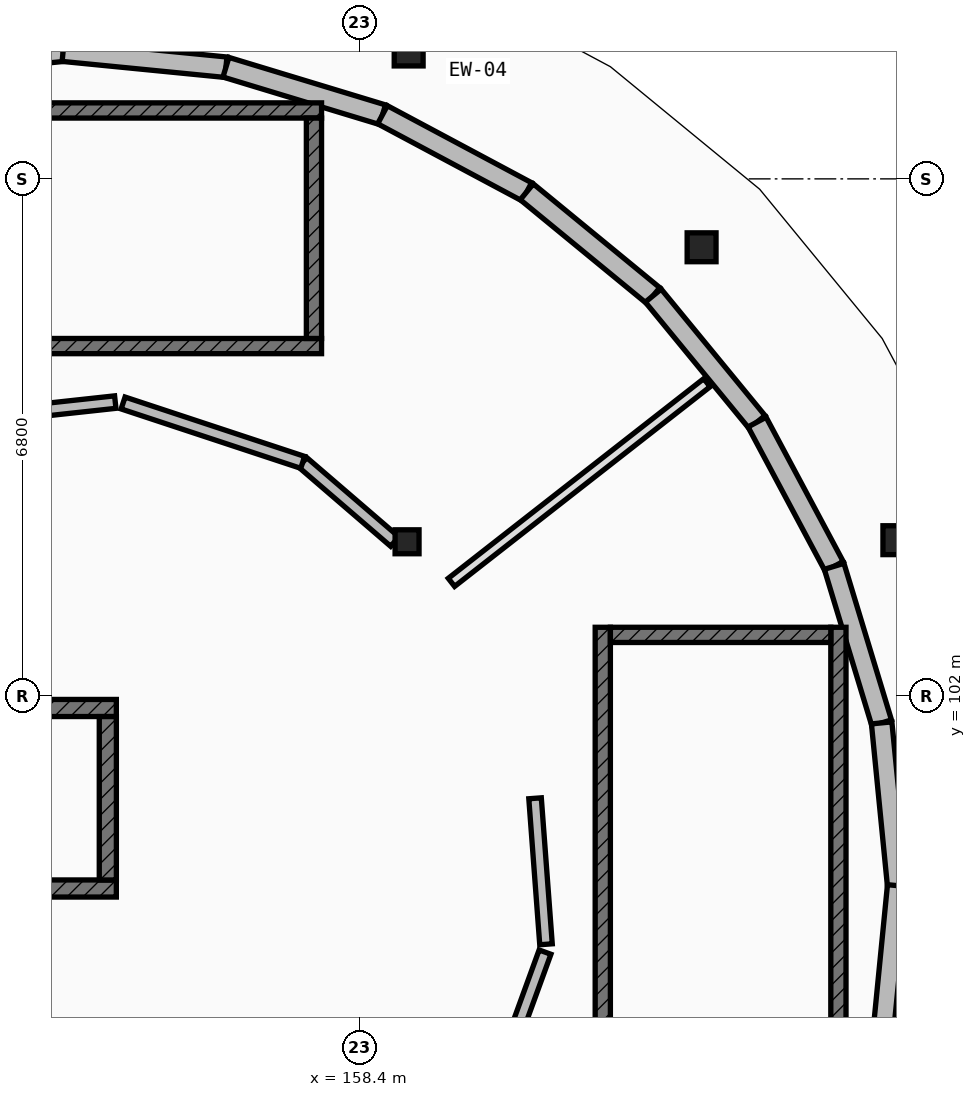
"""IFC4 building model, lengths in metres.
Left out: names, types, materials, properties, quantities, classifications, styles, units other than length and angle.
Written with IfcOpenShell. Run it as: python <this file> out.ifc"""

import sys

from ifc_helpers import new_model, si_unit, direction, frame, frame_2d, origin, origin_2d, place, context, subcontext, project, spatial, rectangle, circle, extrude, element, fill, save


model = new_model("IFC4")
c1 = context("Model", 3, precision=1e-05, world=origin(), true_north=direction((0.0, 1.0)))
c2 = subcontext(c1, "Body", "Model", "MODEL_VIEW")
j1 = project(units=[si_unit("LENGTHUNIT", "METRE"), si_unit("PLANEANGLEUNIT", "RADIAN")], contexts=[c1])
p1 = place(None, origin())
s1 = spatial("IfcSite", under=j1, at=p1, CompositionType="ELEMENT")
p2 = place(p1, origin())
s2 = spatial("IfcBuilding", under=s1, at=p2, CompositionType="ELEMENT")
p3 = place(p2, frame((0.0, 0.0, 12.95)))
s3 = spatial("IfcBuildingStorey", under=s2, at=p3, CompositionType="ELEMENT", Elevation=12.95)
for number, where, z_axis, x_axis in (
    (1, (165.476, 104.046, 0.0), (0.0, 0.0, 1.0), (1.0, 0.0, 0.0)),
    (2, (162.9, 107.9, 0.0), (0.0, 0.0, 1.0), (1.0, 0.0, 0.0)),
    (3, (159.046, 110.476, 0.0), (0.0, 0.0, 1.0), (1.0, 0.0, 0.0)),
):
    element("IfcColumn", number, at=place(p3, frame(where, z_axis=z_axis, x_axis=x_axis)), inside=s3, PredefinedType="PILASTER", context=c2, shape_type="SweptSolid", body=[
        extrude(circle(Radius=0.19, at=origin_2d()), origin(), (0.0, 0.0, 1.0), 4.2),
    ])
p4 = place(p3, frame((159.025, 104.025, 0.0), z_axis=(0.0, 0.0, 1.0), x_axis=(1.0, 0.0, 0.0)))
e4 = element("IfcColumn", 4, at=p4, inside=s3, PredefinedType="COLUMN", context=c2, shape_type="SweptSolid", body=[
    extrude(rectangle(XDim=0.315, YDim=0.315, at=origin_2d()), origin(), (0.0, 0.0, 1.0), 4.2),
])
for number, where, z_axis, x_axis in (
    (5, (152.358, 110.269, 0.0), (0.0, 0.0, 1.0), (0.995, 0.098, 0.0)),
    (6, (154.5, 110.48, 0.0), (0.0, 0.0, 1.0), (0.995, -0.098, 0.0)),
):
    element("IfcWall", number, at=place(p3, frame(where, z_axis=z_axis, x_axis=x_axis)), inside=s3, PredefinedType="ELEMENTEDWALL", context=c2, shape_type="SweptSolid", body=[
        extrude(rectangle(XDim=2.152, YDim=0.27, at=frame_2d((1.076, 0.0))), origin(), (0.0, 0.0, 1.0), 3.314),
    ])
p5 = place(p3, frame((156.642, 110.269, 0.0), z_axis=(0.0, 0.0, 1.0), x_axis=(0.95691941216, -0.290353644083, 0.0)))
e7 = element("IfcWall", 7, at=p5, inside=s3, PredefinedType="ELEMENTEDWALL", context=c2, shape_type="SweptSolid", body=[
    extrude(rectangle(XDim=2.153, YDim=0.27, at=frame_2d((1.076, 0.0))), origin(), (0.0, 0.0, 1.0), 3.314),
])
p6 = place(p5, frame((0.601, 0.0, 0.85)))
e8 = element("IfcOpeningElement", 8, at=p6, cuts=e7, PredefinedType="OPENING", context=c2, shape_type="SweptSolid", body=[
    extrude(rectangle(XDim=0.95, YDim=2.05, at=frame_2d((0.475, 1.025))), frame((0.0, 0.145, 0.0), z_axis=(0.0, -1.0, 0.0), x_axis=(1.0, 0.0, 0.0)), (0.0, 0.0, 1.0), 0.29),
])
p7 = place(p3, frame((158.702, 109.644, 0.0), z_axis=(0.0, 0.0, 1.0), x_axis=(0.882007276215, -0.471235784617, 0.0)))
e9 = element("IfcWall", 9, at=p7, inside=s3, PredefinedType="ELEMENTEDWALL", context=c2, shape_type="SweptSolid", body=[
    extrude(rectangle(XDim=2.152, YDim=0.27, at=frame_2d((1.076, 0.0))), origin(), (0.0, 0.0, 1.0), 3.314),
])
p8 = place(p7, frame((0.586, 0.0, 0.85)))
e10 = element("IfcOpeningElement", 10, at=p8, cuts=e9, PredefinedType="OPENING", context=c2, shape_type="SweptSolid", body=[
    extrude(rectangle(XDim=0.98, YDim=1.5, at=frame_2d((0.49, 0.75))), frame((0.0, 0.145, 0.0), z_axis=(0.0, -1.0, 0.0), x_axis=(1.0, 0.0, 0.0)), (0.0, 0.0, 1.0), 0.29),
])
p9 = place(p3, frame((160.6, 108.63, 0.0), z_axis=(0.0, 0.0, 1.0), x_axis=(0.772895091045, -0.634533827498, 0.0)))
e11 = element("IfcWall", 11, at=p9, inside=s3, PredefinedType="ELEMENTEDWALL", context=c2, shape_type="SweptSolid", body=[
    extrude(rectangle(XDim=2.153, YDim=0.27, at=frame_2d((1.076, 0.0))), origin(), (0.0, 0.0, 1.0), 3.314),
])
p10 = place(p9, frame((0.586, 0.0, 0.85)))
e12 = element("IfcOpeningElement", 12, at=p10, cuts=e11, PredefinedType="OPENING", context=c2, shape_type="SweptSolid", body=[
    extrude(rectangle(XDim=0.98, YDim=1.75, at=frame_2d((0.49, 0.875))), frame((0.0, 0.145, 0.0), z_axis=(0.0, -1.0, 0.0), x_axis=(1.0, 0.0, 0.0)), (0.0, 0.0, 1.0), 0.29),
])
p11 = place(p3, frame((162.264, 107.264, 0.0), z_axis=(0.0, 0.0, 1.0), x_axis=(0.634533827498, -0.772895091045, 0.0)))
e13 = element("IfcWall", 13, at=p11, inside=s3, PredefinedType="ELEMENTEDWALL", context=c2, shape_type="SweptSolid", body=[
    extrude(rectangle(XDim=2.153, YDim=0.27, at=frame_2d((1.076, 0.0))), origin(), (0.0, 0.0, 1.0), 3.314),
])
p12 = place(p11, frame((0.576, 0.0, 0.85)))
e14 = element("IfcOpeningElement", 14, at=p12, cuts=e13, PredefinedType="OPENING", context=c2, shape_type="SweptSolid", body=[
    extrude(rectangle(XDim=1.0, YDim=1.45, at=frame_2d((0.5, 0.725))), frame((0.0, 0.145, 0.0), z_axis=(0.0, -1.0, 0.0), x_axis=(1.0, 0.0, 0.0)), (0.0, 0.0, 1.0), 0.29),
])
p13 = place(p3, frame((163.63, 105.6, 0.0), z_axis=(0.0, 0.0, 1.0), x_axis=(0.471235784617, -0.882007276215, 0.0)))
e15 = element("IfcWall", 15, at=p13, inside=s3, PredefinedType="ELEMENTEDWALL", context=c2, shape_type="SweptSolid", body=[
    extrude(rectangle(XDim=2.152, YDim=0.27, at=frame_2d((1.076, 0.0))), origin(), (0.0, 0.0, 1.0), 3.314),
])
p14 = place(p13, frame((0.576, 0.0, 0.85)))
e16 = element("IfcOpeningElement", 16, at=p14, cuts=e15, PredefinedType="OPENING", context=c2, shape_type="SweptSolid", body=[
    extrude(rectangle(XDim=1.0, YDim=1.75, at=frame_2d((0.5, 0.875))), frame((0.0, 0.145, 0.0), z_axis=(0.0, -1.0, 0.0), x_axis=(1.0, 0.0, 0.0)), (0.0, 0.0, 1.0), 0.29),
])
p15 = place(p3, frame((164.644, 103.702, 0.0), z_axis=(0.0, 0.0, 1.0), x_axis=(0.290353644083, -0.95691941216, 0.0)))
e17 = element("IfcWall", 17, at=p15, inside=s3, PredefinedType="ELEMENTEDWALL", context=c2, shape_type="SweptSolid", body=[
    extrude(rectangle(XDim=2.153, YDim=0.27, at=frame_2d((1.076, 0.0))), origin(), (0.0, 0.0, 1.0), 3.314),
])
p16 = place(p15, frame((0.576, 0.0, 0.85)))
e18 = element("IfcOpeningElement", 18, at=p16, cuts=e17, PredefinedType="OPENING", context=c2, shape_type="SweptSolid", body=[
    extrude(rectangle(XDim=1.0, YDim=2.0, at=frame_2d((0.5, 1.0))), frame((0.0, 0.145, 0.0), z_axis=(0.0, -1.0, 0.0), x_axis=(1.0, 0.0, 0.0)), (0.0, 0.0, 1.0), 0.29),
])
for number, where, z_axis, x_axis in (
    (19, (165.269, 101.642, 0.0), (0.0, 0.0, 1.0), (0.098, -0.995, 0.0)),
    (20, (165.48, 99.5, 0.0), (0.0, 0.0, 1.0), (-0.098, -0.995, 0.0)),
):
    element("IfcWall", number, at=place(p3, frame(where, z_axis=z_axis, x_axis=x_axis)), inside=s3, PredefinedType="ELEMENTEDWALL", context=c2, shape_type="SweptSolid", body=[
        extrude(rectangle(XDim=2.152, YDim=0.27, at=frame_2d((1.076, 0.0))), origin(), (0.0, 0.0, 1.0), 3.314),
    ])
p17 = place(p3, frame((161.6, 102.9, 0.0), z_axis=(0.0, 0.0, 1.0), x_axis=(0.0, -1.0, 0.0)))
e21 = element("IfcWall", 21, at=p17, inside=s3, PredefinedType="SHEAR", context=c2, shape_type="SweptSolid", body=[
    extrude(rectangle(XDim=6.8, YDim=0.2, at=frame_2d((3.4, 0.0))), origin(), (0.0, 0.0, 1.0), 3.96),
])
p18 = place(p17, frame((0.38, 0.0, 0.0)))
e22 = element("IfcOpeningElement", 22, at=p18, cuts=e21, PredefinedType="OPENING", context=c2, shape_type="SweptSolid", body=[
    extrude(rectangle(XDim=1.1, YDim=2.15, at=frame_2d((0.55, 1.075))), frame((0.0, 0.11, 0.0), z_axis=(0.0, -1.0, 0.0), x_axis=(1.0, 0.0, 0.0)), (0.0, 0.0, 1.0), 0.22),
])
p19 = place(p3, frame((164.7, 102.9, 0.0), z_axis=(0.0, 0.0, 1.0), x_axis=(0.0, -1.0, 0.0)))
e23 = element("IfcWall", 23, at=p19, inside=s3, PredefinedType="SHEAR", context=c2, shape_type="SweptSolid", body=[
    extrude(rectangle(XDim=6.8, YDim=0.2, at=frame_2d((3.4, 0.0))), origin(), (0.0, 0.0, 1.0), 3.96),
])
p20 = place(p3, frame((161.7, 102.8, 0.0), z_axis=(0.0, 0.0, 1.0), x_axis=(1.0, 0.0, 0.0)))
e24 = element("IfcWall", 24, at=p20, inside=s3, PredefinedType="SHEAR", context=c2, shape_type="SweptSolid", body=[
    extrude(rectangle(XDim=2.9, YDim=0.2, at=frame_2d((1.45, 0.0))), origin(), (0.0, 0.0, 1.0), 3.96),
])
p21 = place(p3, frame((151.1, 106.6, 0.0), z_axis=(0.0, 0.0, 1.0), x_axis=(1.0, 0.0, 0.0)))
e25 = element("IfcWall", 25, at=p21, inside=s3, PredefinedType="SHEAR", context=c2, shape_type="SweptSolid", body=[
    extrude(rectangle(XDim=6.8, YDim=0.2, at=frame_2d((3.4, 0.0))), origin(), (0.0, 0.0, 1.0), 3.96),
])
p22 = place(p21, frame((0.38, 0.0, 0.0)))
e26 = element("IfcOpeningElement", 26, at=p22, cuts=e25, PredefinedType="OPENING", context=c2, shape_type="SweptSolid", body=[
    extrude(rectangle(XDim=1.1, YDim=2.15, at=frame_2d((0.55, 1.075))), frame((0.0, 0.11, 0.0), z_axis=(0.0, -1.0, 0.0), x_axis=(1.0, 0.0, 0.0)), (0.0, 0.0, 1.0), 0.22),
])
p23 = place(p3, frame((151.1, 109.7, 0.0), z_axis=(0.0, 0.0, 1.0), x_axis=(1.0, 0.0, 0.0)))
e27 = element("IfcWall", 27, at=p23, inside=s3, PredefinedType="SHEAR", context=c2, shape_type="SweptSolid", body=[
    extrude(rectangle(XDim=6.8, YDim=0.2, at=frame_2d((3.4, 0.0))), origin(), (0.0, 0.0, 1.0), 3.96),
])
p24 = place(p3, frame((157.8, 106.7, 0.0), z_axis=(0.0, 0.0, 1.0), x_axis=(0.0, 1.0, 0.0)))
e28 = element("IfcWall", 28, at=p24, inside=s3, PredefinedType="SHEAR", context=c2, shape_type="SweptSolid", body=[
    extrude(rectangle(XDim=2.9, YDim=0.2, at=frame_2d((1.45, 0.0))), origin(), (0.0, 0.0, 1.0), 3.96),
])
p25 = place(p3, frame((152.1, 99.463, 0.0), z_axis=(0.0, 0.0, 1.0), x_axis=(1.0, 0.0, 0.0)))
e29 = element("IfcWall", 29, at=p25, inside=s3, PredefinedType="SHEAR", context=c2, shape_type="SweptSolid", body=[
    extrude(rectangle(XDim=3.1, YDim=0.225, at=frame_2d((1.55, 0.0))), origin(), (0.0, 0.0, 1.0), 3.96),
])
p26 = place(p25, frame((0.9, 0.0, 0.0)))
e30 = element("IfcOpeningElement", 30, at=p26, cuts=e29, PredefinedType="OPENING", context=c2, shape_type="SweptSolid", body=[
    extrude(rectangle(XDim=1.3, YDim=2.2, at=frame_2d((0.65, 1.1))), frame((0.0, 0.123, 0.0), z_axis=(0.0, -1.0, 0.0), x_axis=(1.0, 0.0, 0.0)), (0.0, 0.0, 1.0), 0.245),
])
p27 = place(p3, frame((152.1, 101.838, 0.0), z_axis=(0.0, 0.0, 1.0), x_axis=(1.0, 0.0, 0.0)))
e31 = element("IfcWall", 31, at=p27, inside=s3, PredefinedType="SHEAR", context=c2, shape_type="SweptSolid", body=[
    extrude(rectangle(XDim=3.1, YDim=0.225, at=frame_2d((1.55, 0.0))), origin(), (0.0, 0.0, 1.0), 3.96),
])
p28 = place(p3, frame((155.088, 99.575, 0.0), z_axis=(0.0, 0.0, 1.0), x_axis=(0.0, 1.0, 0.0)))
e32 = element("IfcWall", 32, at=p28, inside=s3, PredefinedType="SHEAR", context=c2, shape_type="SweptSolid", body=[
    extrude(rectangle(XDim=2.15, YDim=0.225, at=frame_2d((1.075, 0.0))), origin(), (0.0, 0.0, 1.0), 3.96),
])
p29 = place(p3, frame((159.609, 103.491, 0.0), z_axis=(0.0, 0.0, 1.0), x_axis=(0.787898546349, 0.615805067096, 0.0)))
e33 = element("IfcWall", 33, at=p29, inside=s3, PredefinedType="PLUMBINGWALL", context=c2, shape_type="SweptSolid", body=[
    extrude(rectangle(XDim=4.266, YDim=0.135, at=frame_2d((2.133, 0.0))), origin(), (0.0, 0.0, 1.0), 3.279),
])
p30 = place(p3, frame((155.186, 105.863, 0.0), z_axis=(0.0, 0.0, 1.0), x_axis=(-0.994121595033, -0.108269359885, 0.0)))
e34 = element("IfcWall", 34, at=p30, inside=s3, PredefinedType="PARTITIONING", context=c2, shape_type="SweptSolid", body=[
    extrude(rectangle(XDim=1.847, YDim=0.165, at=frame_2d((0.923, 0.0))), origin(), (0.0, 0.0, 1.0), 3.279),
])
p31 = place(p3, frame((159.919, 96.095, 0.0), z_axis=(0.0, 0.0, 1.0), x_axis=(0.341997778508, 0.939700760612, 0.0)))
e35 = element("IfcWall", 35, at=p31, inside=s3, PredefinedType="PARTITIONING", context=c2, shape_type="SweptSolid", body=[
    extrude(rectangle(XDim=2.693, YDim=0.165, at=frame_2d((1.347, 0.0))), origin(), (0.0, 0.0, 1.0), 3.279),
])
p32 = place(p3, frame((160.853, 98.729, 0.0), z_axis=(0.0, 0.0, 1.0), x_axis=(-0.074777345003, 0.997200255051, 0.0)))
e36 = element("IfcWall", 36, at=p32, inside=s3, PredefinedType="PARTITIONING", context=c2, shape_type="SweptSolid", body=[
    extrude(rectangle(XDim=1.926, YDim=0.165, at=frame_2d((0.963, 0.0))), origin(), (0.0, 0.0, 1.0), 3.279),
])
p33 = place(p3, frame((158.863, 104.028, 0.0), z_axis=(0.0, 0.0, 1.0), x_axis=(-0.758003845194, 0.652250082921, 0.0)))
e37 = element("IfcWall", 37, at=p33, inside=s3, PredefinedType="PARTITIONING", context=c2, shape_type="SweptSolid", body=[
    extrude(rectangle(XDim=1.598, YDim=0.165, at=frame_2d((0.799, 0.0))), origin(), (0.0, 0.0, 1.0), 3.279),
])
p34 = place(p33, frame((0.309, 0.0, 0.0)))
e38 = element("IfcOpeningElement", 38, at=p34, cuts=e37, PredefinedType="OPENING", context=c2, shape_type="SweptSolid", body=[
    extrude(rectangle(XDim=0.98, YDim=2.1, at=frame_2d((0.49, 1.05))), frame((0.0, 0.093, 0.0), z_axis=(0.0, -1.0, 0.0), x_axis=(1.0, 0.0, 0.0)), (0.0, 0.0, 1.0), 0.185),
])
p35 = place(p3, frame((157.652, 105.07, 0.0), z_axis=(0.0, 0.0, 1.0), x_axis=(-0.949484627373, 0.313813547161, 0.0)))
e39 = element("IfcWall", 39, at=p35, inside=s3, PredefinedType="PARTITIONING", context=c2, shape_type="SweptSolid", body=[
    extrude(rectangle(XDim=2.489, YDim=0.165, at=frame_2d((1.244, 0.0))), origin(), (0.0, 0.0, 1.0), 3.279),
])
p36 = place(p6, origin())
e40 = element("IfcWindow", 40, at=p36, inside=s3, PartitioningType="SINGLE_PANEL", PredefinedType="WINDOW", context=c2, shape_type="SweptSolid", body=[
    extrude(rectangle(XDim=0.95, YDim=2.05, at=frame_2d((0.475, 1.025))), frame((0.0, 0.03, 0.0), z_axis=(0.0, -1.0, 0.0), x_axis=(1.0, 0.0, 0.0)), (0.0, 0.0, 1.0), 0.06),
])
fill(e8, e40)
p37 = place(p8, origin())
e41 = element("IfcWindow", 41, at=p37, inside=s3, PartitioningType="SINGLE_PANEL", PredefinedType="WINDOW", context=c2, shape_type="SweptSolid", body=[
    extrude(rectangle(XDim=0.98, YDim=1.5, at=frame_2d((0.49, 0.75))), frame((0.0, 0.03, 0.0), z_axis=(0.0, -1.0, 0.0), x_axis=(1.0, 0.0, 0.0)), (0.0, 0.0, 1.0), 0.06),
])
fill(e10, e41)
p38 = place(p10, origin())
e42 = element("IfcWindow", 42, at=p38, inside=s3, PartitioningType="SINGLE_PANEL", PredefinedType="WINDOW", context=c2, shape_type="SweptSolid", body=[
    extrude(rectangle(XDim=0.98, YDim=1.75, at=frame_2d((0.49, 0.875))), frame((0.0, 0.03, 0.0), z_axis=(0.0, -1.0, 0.0), x_axis=(1.0, 0.0, 0.0)), (0.0, 0.0, 1.0), 0.06),
])
fill(e12, e42)
p39 = place(p12, origin())
e43 = element("IfcWindow", 43, at=p39, inside=s3, PartitioningType="SINGLE_PANEL", PredefinedType="WINDOW", context=c2, shape_type="SweptSolid", body=[
    extrude(rectangle(XDim=1.0, YDim=1.45, at=frame_2d((0.5, 0.725))), frame((0.0, 0.03, 0.0), z_axis=(0.0, -1.0, 0.0), x_axis=(1.0, 0.0, 0.0)), (0.0, 0.0, 1.0), 0.06),
])
fill(e14, e43)
p40 = place(p14, origin())
e44 = element("IfcWindow", 44, at=p40, inside=s3, PartitioningType="SINGLE_PANEL", PredefinedType="WINDOW", context=c2, shape_type="SweptSolid", body=[
    extrude(rectangle(XDim=1.0, YDim=1.75, at=frame_2d((0.5, 0.875))), frame((0.0, 0.03, 0.0), z_axis=(0.0, -1.0, 0.0), x_axis=(1.0, 0.0, 0.0)), (0.0, 0.0, 1.0), 0.06),
])
fill(e16, e44)
p41 = place(p16, origin())
e45 = element("IfcWindow", 45, at=p41, inside=s3, PartitioningType="SINGLE_PANEL", PredefinedType="WINDOW", context=c2, shape_type="SweptSolid", body=[
    extrude(rectangle(XDim=1.0, YDim=2.0, at=frame_2d((0.5, 1.0))), frame((0.0, 0.03, 0.0), z_axis=(0.0, -1.0, 0.0), x_axis=(1.0, 0.0, 0.0)), (0.0, 0.0, 1.0), 0.06),
])
fill(e18, e45)
p42 = place(p18, origin())
e46 = element("IfcDoor", 46, at=p42, inside=s3, OperationType="SINGLE_SWING_LEFT", PredefinedType="DOOR", context=c2, shape_type="SweptSolid", body=[
    extrude(rectangle(XDim=1.1, YDim=2.15, at=frame_2d((0.55, 1.075))), frame((0.0, 0.025, 0.0), z_axis=(0.0, -1.0, 0.0), x_axis=(1.0, 0.0, 0.0)), (0.0, 0.0, 1.0), 0.05),
])
fill(e22, e46)
p43 = place(p34, origin())
e47 = element("IfcDoor", 47, at=p43, inside=s3, OperationType="SINGLE_SWING_LEFT", PredefinedType="DOOR", context=c2, shape_type="SweptSolid", body=[
    extrude(rectangle(XDim=0.98, YDim=2.1, at=frame_2d((0.49, 1.05))), frame((0.0, 0.025, 0.0), z_axis=(0.0, -1.0, 0.0), x_axis=(1.0, 0.0, 0.0)), (0.0, 0.0, 1.0), 0.05),
])
fill(e38, e47)
save(model, sys.argv[1])
